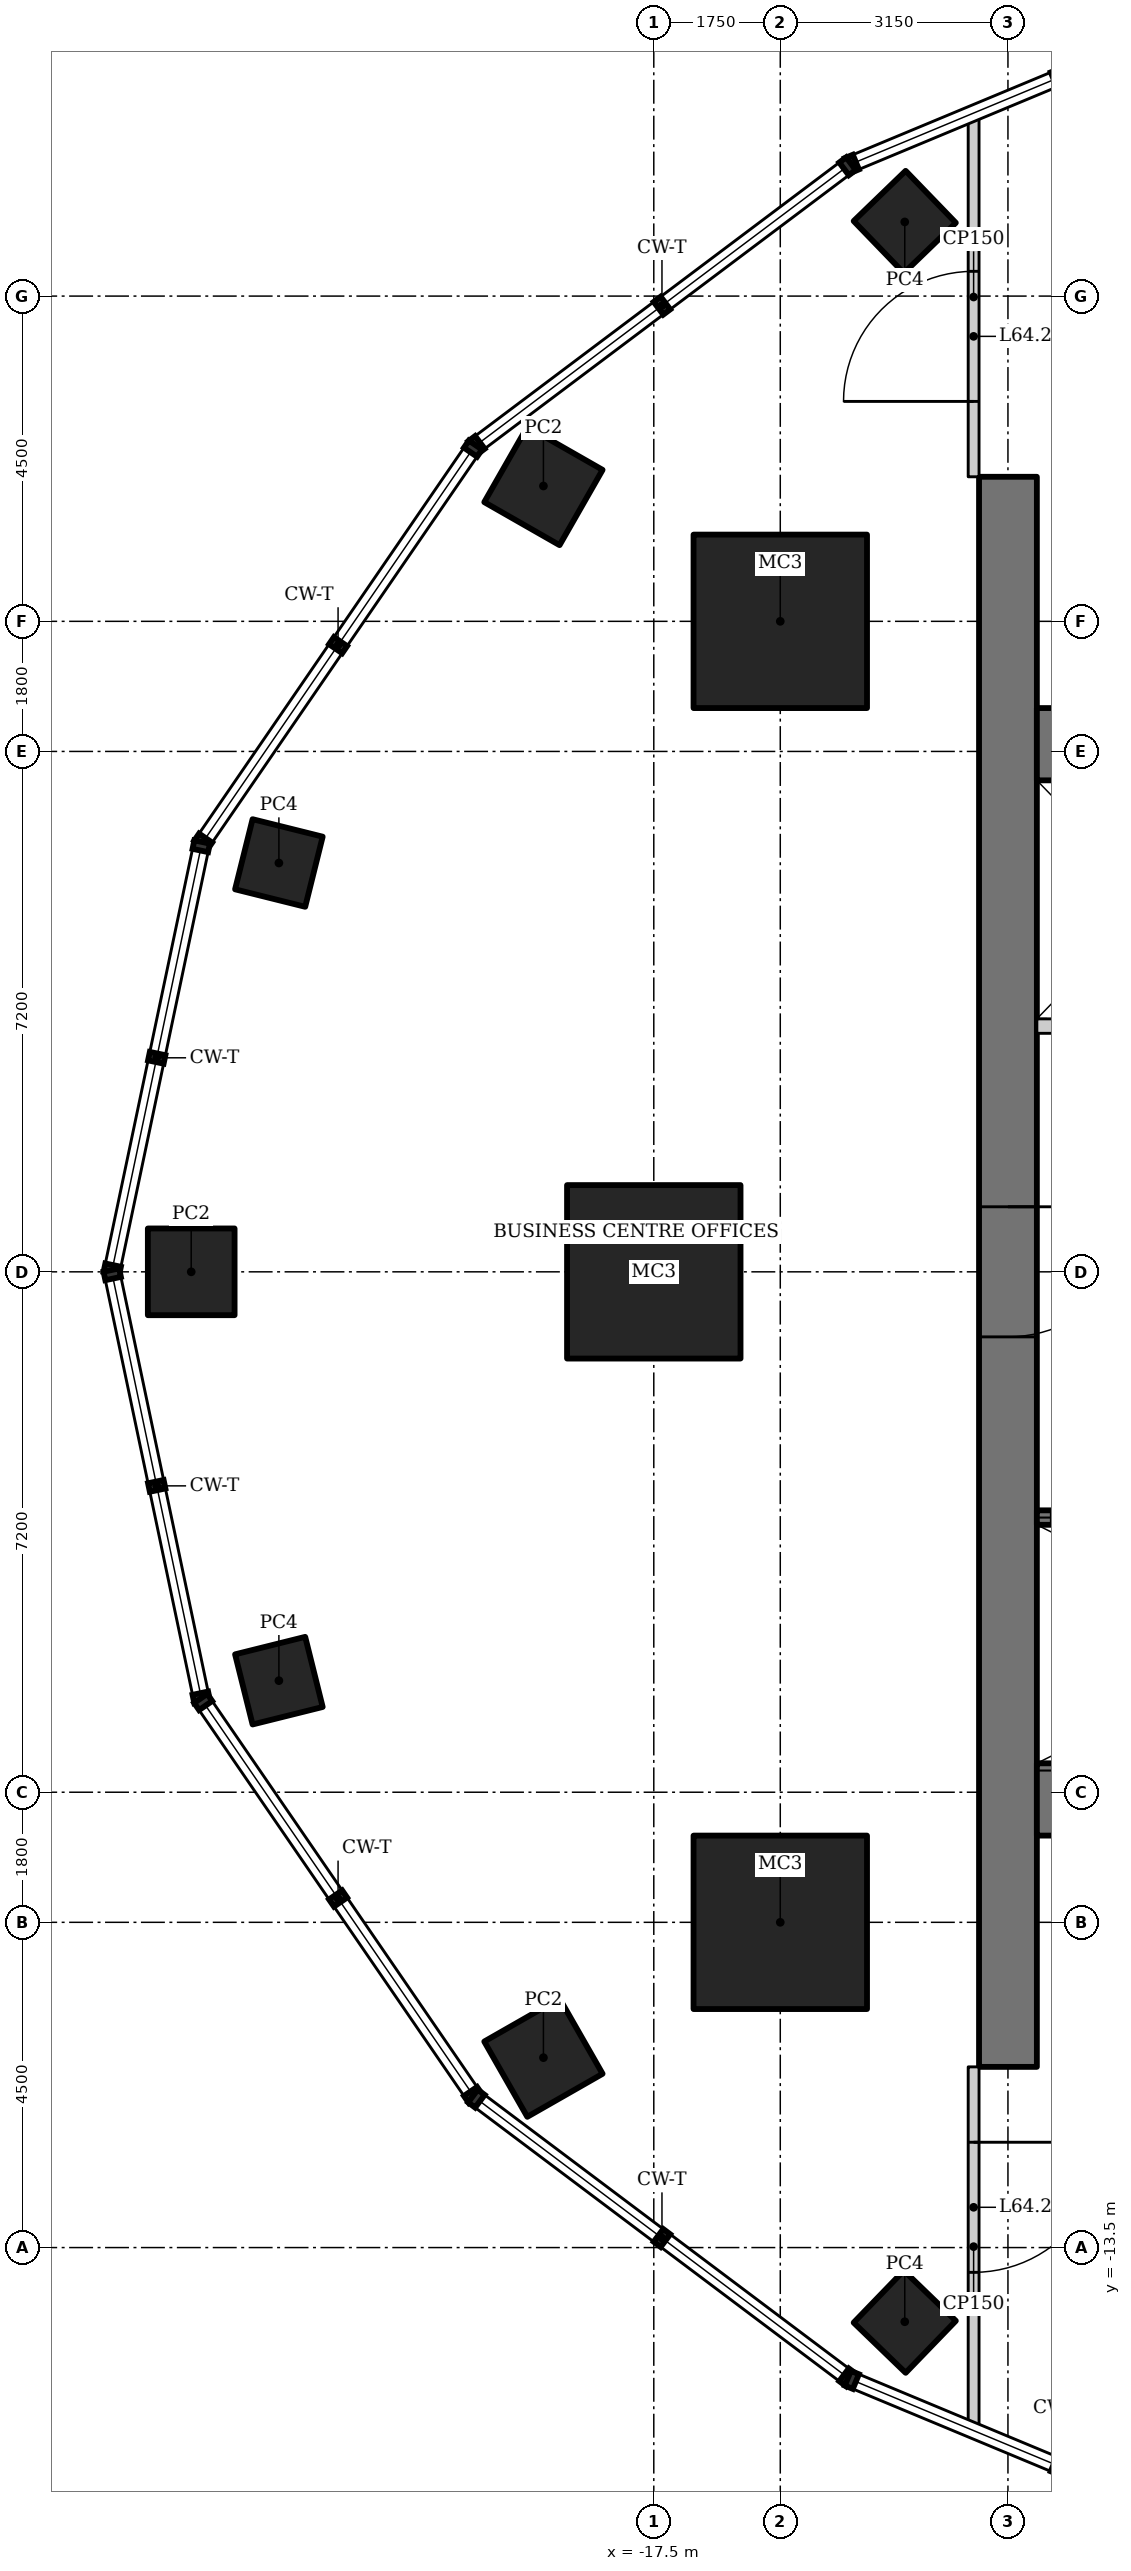
"""IFC4 building model, lengths in metres.
Left out: names, types, materials, properties, quantities, classifications, styles, units other than length and angle.
Written with IfcOpenShell. Run it as: python <this file> out.ifc"""

import sys

from ifc_helpers import new_model, si_unit, direction, frame, frame_2d, origin, origin_2d, place, context, subcontext, project, spatial, rectangle, hollow_rectangle, extrude, element, fill, save


model = new_model("IFC4")
c1 = context("Model", 3, precision=1e-05, world=origin(), true_north=direction((0.0, 1.0)))
c2 = subcontext(c1, "Body", "Model", "MODEL_VIEW")
j1 = project(units=[si_unit("LENGTHUNIT", "METRE"), si_unit("PLANEANGLEUNIT", "RADIAN")], contexts=[c1])
p1 = place(None, origin())
s1 = spatial("IfcSite", under=j1, at=p1, CompositionType="ELEMENT")
p2 = place(p1, origin())
s2 = spatial("IfcBuilding", under=s1, at=p2, CompositionType="ELEMENT")
p3 = place(p2, frame((0.0, 0.0, 274.9)))
s3 = spatial("IfcBuildingStorey", under=s2, at=p3, CompositionType="ELEMENT", Elevation=274.9)
for number, where, z_axis, x_axis in (
    (1, (-15.75, 9.0, 0.0), (0.0, 0.0, 1.0), (1.0, 0.0, 0.0)),
    (2, (-17.5, 0.0, 0.0), (0.0, 0.0, 1.0), (1.0, 0.0, 0.0)),
    (3, (-15.75, -9.0, 0.0), (0.0, 0.0, 1.0), (1.0, 0.0, 0.0)),
):
    element("IfcColumn", number, at=place(p3, frame(where, z_axis=z_axis, x_axis=x_axis)), inside=s3, PredefinedType="COLUMN", context=c2, shape_type="SweptSolid", body=[
        extrude(hollow_rectangle(XDim=2.4, YDim=2.4, WallThickness=0.12, at=origin_2d()), origin(), (0.0, 0.0, 1.0), 4.5),
    ])
p4 = place(p3, frame((-14.028, 14.526, 0.0), z_axis=(0.0, 0.0, 1.0), x_axis=(0.719339800339, 0.694658370459, 0.0)))
e4 = element("IfcColumn", 4, at=p4, inside=s3, PredefinedType="COLUMN", context=c2, shape_type="SweptSolid", body=[
    extrude(hollow_rectangle(XDim=1.0, YDim=1.0, WallThickness=0.08, at=origin_2d()), origin(), (0.0, 0.0, 1.0), 4.5),
])
p5 = place(p3, frame((-19.027, 10.873, 0.0), z_axis=(0.0, 0.0, 1.0), x_axis=(0.496139221777, 0.86824298017, 0.0)))
e5 = element("IfcColumn", 5, at=p5, inside=s3, PredefinedType="COLUMN", context=c2, shape_type="SweptSolid", body=[
    extrude(hollow_rectangle(XDim=1.2, YDim=1.2, WallThickness=0.1, at=origin_2d()), origin(), (0.0, 0.0, 1.0), 4.5),
])
p6 = place(p3, frame((-22.687, 5.656, 0.0), z_axis=(0.0, 0.0, 1.0), x_axis=(0.2419218956, 0.970295726276, 0.0)))
e6 = element("IfcColumn", 6, at=p6, inside=s3, PredefinedType="COLUMN", context=c2, shape_type="SweptSolid", body=[
    extrude(hollow_rectangle(XDim=1.0, YDim=1.0, WallThickness=0.08, at=origin_2d()), origin(), (0.0, 0.0, 1.0), 4.5),
])
p7 = place(p3, frame((-23.9, 0.0, 0.0), z_axis=(0.0, 0.0, 1.0), x_axis=(1.0, 0.0, 0.0)))
e7 = element("IfcColumn", 7, at=p7, inside=s3, PredefinedType="COLUMN", context=c2, shape_type="SweptSolid", body=[
    extrude(hollow_rectangle(XDim=1.2, YDim=1.2, WallThickness=0.1, at=origin_2d()), origin(), (0.0, 0.0, 1.0), 4.5),
])
p8 = place(p3, frame((-22.687, -5.656, 0.0), z_axis=(0.0, 0.0, 1.0), x_axis=(0.970295726276, 0.2419218956, 0.0)))
e8 = element("IfcColumn", 8, at=p8, inside=s3, PredefinedType="COLUMN", context=c2, shape_type="SweptSolid", body=[
    extrude(hollow_rectangle(XDim=1.0, YDim=1.0, WallThickness=0.08, at=origin_2d()), origin(), (0.0, 0.0, 1.0), 4.5),
])
p9 = place(p3, frame((-19.027, -10.873, 0.0), z_axis=(0.0, 0.0, 1.0), x_axis=(0.86824298017, 0.496139221777, 0.0)))
e9 = element("IfcColumn", 9, at=p9, inside=s3, PredefinedType="COLUMN", context=c2, shape_type="SweptSolid", body=[
    extrude(hollow_rectangle(XDim=1.2, YDim=1.2, WallThickness=0.1, at=origin_2d()), origin(), (0.0, 0.0, 1.0), 4.5),
])
p10 = place(p3, frame((-14.028, -14.526, 0.0), z_axis=(0.0, 0.0, 1.0), x_axis=(0.694658370459, 0.719339800339, 0.0)))
e10 = element("IfcColumn", 10, at=p10, inside=s3, PredefinedType="COLUMN", context=c2, shape_type="SweptSolid", body=[
    extrude(hollow_rectangle(XDim=1.0, YDim=1.0, WallThickness=0.08, at=origin_2d()), origin(), (0.0, 0.0, 1.0), 4.5),
])
p11 = place(p3, frame((-12.6, 11.0, 0.0), z_axis=(0.0, 0.0, 1.0), x_axis=(0.0, -1.0, 0.0)))
e11 = element("IfcWall", 11, at=p11, inside=s3, PredefinedType="SHEAR", context=c2, shape_type="SweptSolid", body=[
    extrude(rectangle(XDim=22.0, YDim=0.8, at=frame_2d((11.0, 0.0))), origin(), (0.0, 0.0, 1.0), 4.5),
])
p12 = place(p11, frame((10.1, 0.0, 0.0)))
e12 = element("IfcOpeningElement", 12, at=p12, cuts=e11, PredefinedType="OPENING", context=c2, shape_type="SweptSolid", body=[
    extrude(rectangle(XDim=1.8, YDim=2.1, at=frame_2d((0.9, 1.05))), frame((0.0, 0.41, 0.0), z_axis=(0.0, -1.0, 0.0), x_axis=(1.0, 0.0, 0.0)), (0.0, 0.0, 1.0), 0.82),
])
p13 = place(p3, frame((-12.2, -7.3, 0.0), z_axis=(0.0, 0.0, 1.0), x_axis=(1.0, 0.0, 0.0)))
e13 = element("IfcWall", 13, at=p13, inside=s3, PredefinedType="SHEAR", context=c2, shape_type="SweptSolid", body=[
    extrude(rectangle(XDim=24.4, YDim=1.0, at=frame_2d((12.2, 0.0))), origin(), (0.0, 0.0, 1.0), 4.5),
])
p14 = place(p3, frame((-5.6, 7.3, 0.0), z_axis=(0.0, 0.0, 1.0), x_axis=(-1.0, 0.0, 0.0)))
e14 = element("IfcWall", 14, at=p14, inside=s3, PredefinedType="SHEAR", context=c2, shape_type="SweptSolid", body=[
    extrude(rectangle(XDim=6.6, YDim=1.0, at=frame_2d((3.3, 0.0))), origin(), (0.0, 0.0, 1.0), 4.5),
])
p15 = place(p3, frame((-5.6, -3.4, 0.0), z_axis=(0.0, 0.0, 1.0), x_axis=(-1.0, 0.0, 0.0)))
e15 = element("IfcWall", 15, at=p15, inside=s3, PredefinedType="SHEAR", context=c2, shape_type="SweptSolid", body=[
    extrude(rectangle(XDim=6.6, YDim=0.2, at=frame_2d((3.3, 0.0))), origin(), (0.0, 0.0, 1.0), 4.5),
])
p16 = place(p15, frame((5.2, 0.0, 0.0)))
e16 = element("IfcOpeningElement", 16, at=p16, cuts=e15, PredefinedType="OPENING", context=c2, shape_type="SweptSolid", body=[
    extrude(rectangle(XDim=1.2, YDim=2.1, at=frame_2d((0.6, 1.05))), frame((0.0, 0.11, 0.0), z_axis=(0.0, -1.0, 0.0), x_axis=(1.0, 0.0, 0.0)), (0.0, 0.0, 1.0), 0.22),
])
p17 = place(p3, frame((-12.2, 3.4, 0.0), z_axis=(0.0, 0.0, 1.0), x_axis=(1.0, 0.0, 0.0)))
e17 = element("IfcWall", 17, at=p17, inside=s3, PredefinedType="SOLIDWALL", context=c2, shape_type="SweptSolid", body=[
    extrude(rectangle(XDim=6.6, YDim=0.2, at=frame_2d((3.3, 0.0))), origin(), (0.0, 0.0, 1.0), 4.5),
])
p18 = place(p17, frame((1.05, 0.0, 0.0)))
e18 = element("IfcOpeningElement", 18, at=p18, cuts=e17, PredefinedType="OPENING", context=c2, shape_type="SweptSolid", body=[
    extrude(rectangle(XDim=1.1, YDim=2.2, at=frame_2d((0.55, 1.1))), frame((0.0, 0.11, 0.0), z_axis=(0.0, -1.0, 0.0), x_axis=(1.0, 0.0, 0.0)), (0.0, 0.0, 1.0), 0.22),
])
p19 = place(p17, frame((4.3, 0.0, 0.0)))
e19 = element("IfcOpeningElement", 19, at=p19, cuts=e17, PredefinedType="OPENING", context=c2, shape_type="SweptSolid", body=[
    extrude(rectangle(XDim=1.4, YDim=2.2, at=frame_2d((0.7, 1.1))), frame((0.0, 0.11, 0.0), z_axis=(0.0, -1.0, 0.0), x_axis=(1.0, 0.0, 0.0)), (0.0, 0.0, 1.0), 0.22),
])
p20 = place(p3, frame((-13.075, -11.0, 0.0), z_axis=(0.0, 0.0, 1.0), x_axis=(0.0, -1.0, 0.0)))
e20 = element("IfcWall", 20, at=p20, inside=s3, PredefinedType="PARTITIONING", context=c2, shape_type="SweptSolid", body=[
    extrude(rectangle(XDim=4.974, YDim=0.15, at=frame_2d((2.487, 0.0))), origin(), (0.0, 0.0, 1.0), 4.35),
])
p21 = place(p20, frame((1.043, 0.0, 0.0)))
e21 = element("IfcOpeningElement", 21, at=p21, cuts=e20, PredefinedType="OPENING", context=c2, shape_type="SweptSolid", body=[
    extrude(rectangle(XDim=1.8, YDim=2.1, at=frame_2d((0.9, 1.05))), frame((0.0, 0.085, 0.0), z_axis=(0.0, -1.0, 0.0), x_axis=(1.0, 0.0, 0.0)), (0.0, 0.0, 1.0), 0.17),
])
p22 = place(p3, frame((-13.075, 11.0, 0.0), z_axis=(0.0, 0.0, 1.0), x_axis=(0.0, 1.0, 0.0)))
e22 = element("IfcWall", 22, at=p22, inside=s3, PredefinedType="PARTITIONING", context=c2, shape_type="SweptSolid", body=[
    extrude(rectangle(XDim=4.974, YDim=0.15, at=frame_2d((2.487, 0.0))), origin(), (0.0, 0.0, 1.0), 4.35),
])
p23 = place(p22, frame((1.043, 0.0, 0.0)))
e23 = element("IfcOpeningElement", 23, at=p23, cuts=e22, PredefinedType="OPENING", context=c2, shape_type="SweptSolid", body=[
    extrude(rectangle(XDim=1.8, YDim=2.1, at=frame_2d((0.9, 1.05))), frame((0.0, 0.085, 0.0), z_axis=(0.0, -1.0, 0.0), x_axis=(1.0, 0.0, 0.0)), (0.0, 0.0, 1.0), 0.17),
])
p24 = place(p16, origin())
e24 = element("IfcDoor", 24, at=p24, inside=s3, OperationType="SINGLE_SWING_RIGHT", PredefinedType="DOOR", context=c2, shape_type="SweptSolid", body=[
    extrude(rectangle(XDim=1.2, YDim=2.1, at=frame_2d((0.6, 1.05))), frame((0.0, 0.025, 0.0), z_axis=(0.0, -1.0, 0.0), x_axis=(1.0, 0.0, 0.0)), (0.0, 0.0, 1.0), 0.05),
])
fill(e16, e24)
p25 = place(p12, origin())
e25 = element("IfcDoor", 25, at=p25, inside=s3, OperationType="DOUBLE_DOOR_DOUBLE_SWING", PredefinedType="DOOR", context=c2, shape_type="SweptSolid", body=[
    extrude(rectangle(XDim=1.8, YDim=2.1, at=frame_2d((0.9, 1.05))), frame((0.0, 0.025, 0.0), z_axis=(0.0, -1.0, 0.0), x_axis=(1.0, 0.0, 0.0)), (0.0, 0.0, 1.0), 0.05),
])
fill(e12, e25)
p26 = place(p21, origin())
e26 = element("IfcDoor", 26, at=p26, inside=s3, OperationType="DOUBLE_DOOR_DOUBLE_SWING", PredefinedType="DOOR", context=c2, shape_type="SweptSolid", body=[
    extrude(rectangle(XDim=1.8, YDim=2.1, at=frame_2d((0.9, 1.05))), frame((0.0, 0.025, 0.0), z_axis=(0.0, -1.0, 0.0), x_axis=(1.0, 0.0, 0.0)), (0.0, 0.0, 1.0), 0.05),
])
fill(e21, e26)
p27 = place(p23, origin())
e27 = element("IfcDoor", 27, at=p27, inside=s3, OperationType="DOUBLE_DOOR_DOUBLE_SWING", PredefinedType="DOOR", context=c2, shape_type="SweptSolid", body=[
    extrude(rectangle(XDim=1.8, YDim=2.1, at=frame_2d((0.9, 1.05))), frame((0.0, 0.025, 0.0), z_axis=(0.0, -1.0, 0.0), x_axis=(1.0, 0.0, 0.0)), (0.0, 0.0, 1.0), 0.05),
])
fill(e23, e27)
save(model, sys.argv[1])
